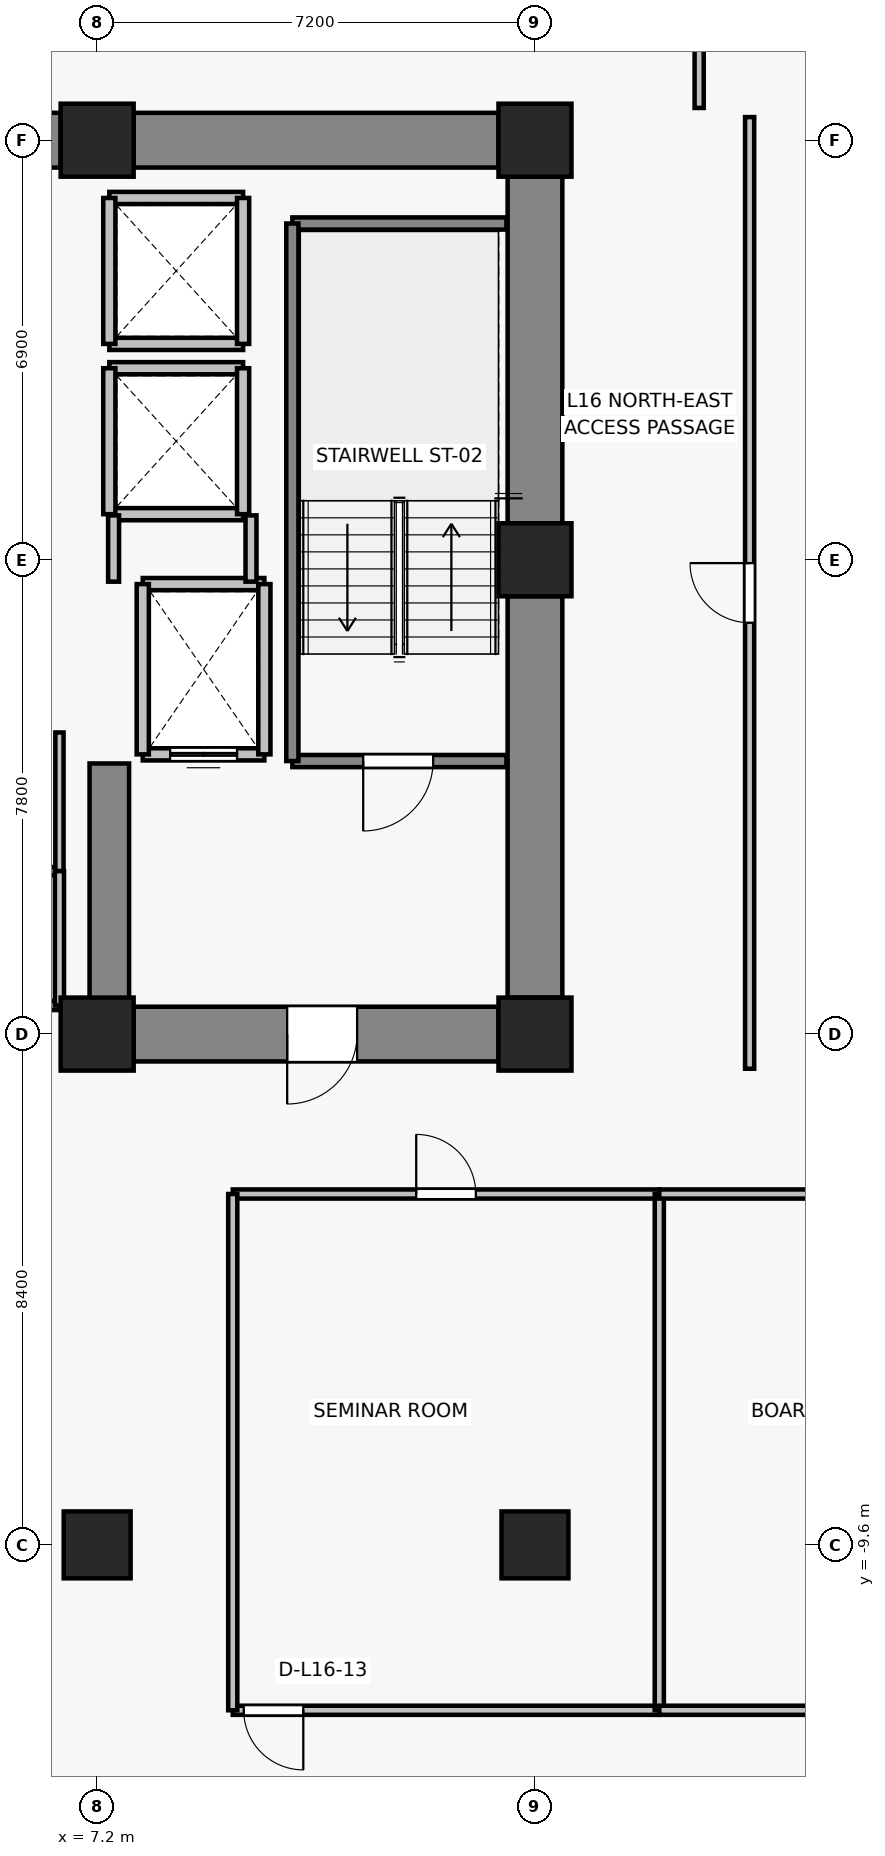
"""IFC4 building model, lengths in metres.
Left out: names, types, materials, properties, quantities, classifications, styles, units other than length and angle.
Written with IfcOpenShell. Run it as: python <this file> out.ifc"""

import sys

from ifc_helpers import new_model, si_unit, direction, frame, frame_2d, origin, origin_2d, place, context, subcontext, project, spatial, rectangle, extrude, source, transform, mapped, element, fill, save


model = new_model("IFC4")
c1 = context("Model", 3, precision=1e-05, world=origin(), true_north=direction((0.0, 1.0)))
c2 = subcontext(c1, "Body", "Model", "MODEL_VIEW")
j1 = project(units=[si_unit("LENGTHUNIT", "METRE"), si_unit("PLANEANGLEUNIT", "RADIAN")], contexts=[c1])
p1 = place(None, origin())
s1 = spatial("IfcSite", under=j1, at=p1, CompositionType="ELEMENT")
p2 = place(p1, origin())
s2 = spatial("IfcBuilding", under=s1, at=p2, CompositionType="ELEMENT")
p3 = place(p2, frame((0.0, 0.0, 60.4)))
s3 = spatial("IfcBuildingStorey", under=s2, at=p3, CompositionType="ELEMENT", Elevation=60.4)
for number, where, z_axis, x_axis in (
    (1, (7.2, -1.2, 0.0), (0.0, 0.0, 1.0), (1.0, 0.0, 0.0)),
    (2, (14.4, -1.2, 0.0), (0.0, 0.0, 1.0), (1.0, 0.0, 0.0)),
    (3, (14.4, 6.6, 0.0), (0.0, 0.0, 1.0), (1.0, 0.0, 0.0)),
    (4, (7.2, 13.5, 0.0), (0.0, 0.0, 1.0), (1.0, 0.0, 0.0)),
    (5, (14.4, 13.5, 0.0), (0.0, 0.0, 1.0), (1.0, 0.0, 0.0)),
):
    element("IfcColumn", number, at=place(p3, frame(where, z_axis=z_axis, x_axis=x_axis)), inside=s3, PredefinedType="COLUMN", context=c2, shape_type="SweptSolid", body=[
        extrude(rectangle(XDim=1.2, YDim=1.2, at=origin_2d()), origin(), (0.0, 0.0, 1.0), 3.3),
    ])
for number, where, z_axis, x_axis in (
    (6, (7.2, -9.6, 0.0), (0.0, 0.0, 1.0), (1.0, 0.0, 0.0)),
    (7, (14.4, -9.6, 0.0), (0.0, 0.0, 1.0), (1.0, 0.0, 0.0)),
):
    element("IfcColumn", number, at=place(p3, frame(where, z_axis=z_axis, x_axis=x_axis)), inside=s3, PredefinedType="COLUMN", context=c2, shape_type="SweptSolid", body=[
        extrude(rectangle(XDim=1.1, YDim=1.1, at=origin_2d()), origin(), (0.0, 0.0, 1.0), 3.3),
    ])
p4 = place(p3, frame((-6.6, 13.5, 0.0), z_axis=(0.0, 0.0, 1.0), x_axis=(1.0, 0.0, 0.0)))
e8 = element("IfcWall", 8, at=p4, inside=s3, PredefinedType="SHEAR", context=c2, shape_type="SweptSolid", body=[
    extrude(rectangle(XDim=13.2, YDim=0.9, at=frame_2d((6.6, 0.0))), origin(), (0.0, 0.0, 1.0), 3.075),
])
p5 = place(p3, frame((7.8, 13.5, 0.0), z_axis=(0.0, 0.0, 1.0), x_axis=(1.0, 0.0, 0.0)))
e9 = element("IfcWall", 9, at=p5, inside=s3, PredefinedType="SHEAR", context=c2, shape_type="SweptSolid", body=[
    extrude(rectangle(XDim=6.0, YDim=0.9, at=frame_2d((3.0, 0.0))), origin(), (0.0, 0.0, 1.0), 3.075),
])
p6 = place(p3, frame((14.4, -0.6, 0.0), z_axis=(0.0, 0.0, 1.0), x_axis=(0.0, 1.0, 0.0)))
e10 = element("IfcWall", 10, at=p6, inside=s3, PredefinedType="SHEAR", context=c2, shape_type="SweptSolid", body=[
    extrude(rectangle(XDim=6.6, YDim=0.9, at=frame_2d((3.3, 0.0))), origin(), (0.0, 0.0, 1.0), 3.075),
])
p7 = place(p3, frame((14.4, 7.2, 0.0), z_axis=(0.0, 0.0, 1.0), x_axis=(0.0, 1.0, 0.0)))
e11 = element("IfcWall", 11, at=p7, inside=s3, PredefinedType="SHEAR", context=c2, shape_type="SweptSolid", body=[
    extrude(rectangle(XDim=5.7, YDim=0.9, at=frame_2d((2.85, 0.0))), origin(), (0.0, 0.0, 1.0), 3.075),
])
p8 = place(p3, frame((13.8, -1.2, 0.0), z_axis=(0.0, 0.0, 1.0), x_axis=(-1.0, 0.0, 0.0)))
e12 = element("IfcWall", 12, at=p8, inside=s3, PredefinedType="SHEAR", context=c2, shape_type="SweptSolid", body=[
    extrude(rectangle(XDim=6.0, YDim=0.9, at=frame_2d((3.0, 0.0))), origin(), (0.0, 0.0, 1.0), 3.075),
])
p9 = place(p8, frame((2.325, 0.0, 0.0)))
e13 = element("IfcOpeningElement", 13, at=p9, cuts=e12, PredefinedType="OPENING", context=c2, shape_type="SweptSolid", body=[
    extrude(rectangle(XDim=1.15, YDim=2.15, at=frame_2d((0.575, 1.075))), frame((0.0, 0.46, 0.0), z_axis=(0.0, -1.0, 0.0), x_axis=(1.0, 0.0, 0.0)), (0.0, 0.0, 1.0), 0.92),
])
p10 = place(p3, frame((7.4, -0.75, 0.0), z_axis=(0.0, 0.0, 1.0), x_axis=(0.0, 1.0, 0.0)))
e14 = element("IfcWall", 14, at=p10, inside=s3, PredefinedType="SHEAR", context=c2, shape_type="SweptSolid", body=[
    extrude(rectangle(XDim=4.0, YDim=0.65, at=frame_2d((2.0, 0.0))), origin(), (0.0, 0.0, 1.0), 3.075),
])
p11 = place(p3, frame((9.95, 3.4, 0.0), z_axis=(0.0, 0.0, 1.0), x_axis=(-1.0, 0.0, 0.0)))
e15 = element("IfcWall", 15, at=p11, inside=s3, PredefinedType="SOLIDWALL", context=c2, shape_type="SweptSolid", body=[
    extrude(rectangle(XDim=2.0, YDim=0.2, at=frame_2d((1.0, 0.0))), origin(), (0.0, 0.0, 1.0), 3.075),
])
p12 = place(p11, frame((0.45, 0.0, 0.0)))
e16 = element("IfcOpeningElement", 16, at=p12, cuts=e15, PredefinedType="OPENING", context=c2, shape_type="SweptSolid", body=[
    extrude(rectangle(XDim=1.1, YDim=2.2, at=frame_2d((0.55, 1.1))), frame((0.0, 0.11, 0.0), z_axis=(0.0, -1.0, 0.0), x_axis=(1.0, 0.0, 0.0)), (0.0, 0.0, 1.0), 0.22),
])
p13 = place(p3, frame((7.95, 6.2, 0.0), z_axis=(0.0, 0.0, 1.0), x_axis=(1.0, 0.0, 0.0)))
e17 = element("IfcWall", 17, at=p13, inside=s3, PredefinedType="SOLIDWALL", context=c2, shape_type="SweptSolid", body=[
    extrude(rectangle(XDim=2.0, YDim=0.2, at=frame_2d((1.0, 0.0))), origin(), (0.0, 0.0, 1.0), 3.075),
])
for number, where, z_axis, x_axis in (
    (18, (7.95, 3.4, 0.0), (0.0, 0.0, 1.0), (0.0, 1.0, 0.0)),
    (19, (9.95, 6.2, 0.0), (0.0, 0.0, 1.0), (0.0, -1.0, 0.0)),
):
    element("IfcWall", number, at=place(p3, frame(where, z_axis=z_axis, x_axis=x_axis)), inside=s3, PredefinedType="SOLIDWALL", context=c2, shape_type="SweptSolid", body=[
        extrude(rectangle(XDim=2.8, YDim=0.2, at=frame_2d((1.4, 0.0))), origin(), (0.0, 0.0, 1.0), 3.075),
    ])
for number, where, z_axis, x_axis in (
    (20, (9.6, 7.35, 0.0), (0.0, 0.0, 1.0), (-1.0, 0.0, 0.0)),
    (21, (7.4, 9.75, 0.0), (0.0, 0.0, 1.0), (1.0, 0.0, 0.0)),
):
    element("IfcWall", number, at=place(p3, frame(where, z_axis=z_axis, x_axis=x_axis)), inside=s3, PredefinedType="SOLIDWALL", context=c2, shape_type="SweptSolid", body=[
        extrude(rectangle(XDim=2.2, YDim=0.2, at=frame_2d((1.1, 0.0))), origin(), (0.0, 0.0, 1.0), 2.465),
    ])
p14 = place(p3, frame((7.4, 7.35, 0.0), z_axis=(0.0, 0.0, 1.0), x_axis=(0.0, 1.0, 0.0)))
e22 = element("IfcWall", 22, at=p14, inside=s3, PredefinedType="SOLIDWALL", context=c2, shape_type="SweptSolid", body=[
    extrude(rectangle(XDim=2.4, YDim=0.2, at=frame_2d((1.2, 0.0))), origin(), (0.0, 0.0, 1.0), 2.465),
])
p15 = place(p3, frame((9.6, 9.75, 0.0), z_axis=(0.0, 0.0, 1.0), x_axis=(0.0, -1.0, 0.0)))
e23 = element("IfcWall", 23, at=p15, inside=s3, PredefinedType="SOLIDWALL", context=c2, shape_type="SweptSolid", body=[
    extrude(rectangle(XDim=2.4, YDim=0.2, at=frame_2d((1.2, 0.0))), origin(), (0.0, 0.0, 1.0), 3.075),
])
for number, where, z_axis, x_axis in (
    (24, (9.6, 10.15, 0.0), (0.0, 0.0, 1.0), (-1.0, 0.0, 0.0)),
    (25, (7.4, 12.55, 0.0), (0.0, 0.0, 1.0), (1.0, 0.0, 0.0)),
):
    element("IfcWall", number, at=place(p3, frame(where, z_axis=z_axis, x_axis=x_axis)), inside=s3, PredefinedType="SOLIDWALL", context=c2, shape_type="SweptSolid", body=[
        extrude(rectangle(XDim=2.2, YDim=0.2, at=frame_2d((1.1, 0.0))), origin(), (0.0, 0.0, 1.0), 2.465),
    ])
p16 = place(p3, frame((7.4, 10.15, 0.0), z_axis=(0.0, 0.0, 1.0), x_axis=(0.0, 1.0, 0.0)))
e26 = element("IfcWall", 26, at=p16, inside=s3, PredefinedType="SOLIDWALL", context=c2, shape_type="SweptSolid", body=[
    extrude(rectangle(XDim=2.4, YDim=0.2, at=frame_2d((1.2, 0.0))), origin(), (0.0, 0.0, 1.0), 2.465),
])
p17 = place(p3, frame((9.6, 12.55, 0.0), z_axis=(0.0, 0.0, 1.0), x_axis=(0.0, -1.0, 0.0)))
e27 = element("IfcWall", 27, at=p17, inside=s3, PredefinedType="SOLIDWALL", context=c2, shape_type="SweptSolid", body=[
    extrude(rectangle(XDim=2.4, YDim=0.2, at=frame_2d((1.2, 0.0))), origin(), (0.0, 0.0, 1.0), 3.075),
])
p18 = place(p3, frame((13.93, 3.29, 0.0), z_axis=(0.0, 0.0, 1.0), x_axis=(-1.0, 0.0, 0.0)))
e28 = element("IfcWall", 28, at=p18, inside=s3, PredefinedType="SOLIDWALL", context=c2, shape_type="SweptSolid", body=[
    extrude(rectangle(XDim=3.52, YDim=0.2, at=frame_2d((1.76, 0.0))), origin(), (0.0, 0.0, 1.0), 3.075),
])
p19 = place(p18, frame((1.205, 0.0, 0.0)))
e29 = element("IfcOpeningElement", 29, at=p19, cuts=e28, PredefinedType="OPENING", context=c2, shape_type="SweptSolid", body=[
    extrude(rectangle(XDim=1.15, YDim=2.15, at=frame_2d((0.575, 1.075))), frame((0.0, 0.11, 0.0), z_axis=(0.0, -1.0, 0.0), x_axis=(1.0, 0.0, 0.0)), (0.0, 0.0, 1.0), 0.22),
])
p20 = place(p3, frame((10.41, 12.13, 0.0), z_axis=(0.0, 0.0, 1.0), x_axis=(1.0, 0.0, 0.0)))
e30 = element("IfcWall", 30, at=p20, inside=s3, PredefinedType="SOLIDWALL", context=c2, shape_type="SweptSolid", body=[
    extrude(rectangle(XDim=3.52, YDim=0.2, at=frame_2d((1.76, 0.0))), origin(), (0.0, 0.0, 1.0), 3.075),
])
p21 = place(p3, frame((10.41, 3.29, 0.0), z_axis=(0.0, 0.0, 1.0), x_axis=(0.0, 1.0, 0.0)))
e31 = element("IfcWall", 31, at=p21, inside=s3, PredefinedType="SOLIDWALL", context=c2, shape_type="SweptSolid", body=[
    extrude(rectangle(XDim=8.84, YDim=0.2, at=frame_2d((4.42, 0.0))), origin(), (0.0, 0.0, 1.0), 3.075),
])
p22 = place(p3, frame((7.47, 6.24, 0.0), z_axis=(0.0, 0.0, 1.0), x_axis=(0.0, 1.0, 0.0)))
e32 = element("IfcWall", 32, at=p22, inside=s3, PredefinedType="PARTITIONING", context=c2, shape_type="SweptSolid", body=[
    extrude(rectangle(XDim=1.09, YDim=0.18, at=frame_2d((0.545, 0.0))), origin(), (0.0, 0.0, 1.0), 2.465),
])
p23 = place(p3, frame((9.73, 7.33, 0.0), z_axis=(0.0, 0.0, 1.0), x_axis=(0.0, -1.0, 0.0)))
e33 = element("IfcWall", 33, at=p23, inside=s3, PredefinedType="PARTITIONING", context=c2, shape_type="SweptSolid", body=[
    extrude(rectangle(XDim=1.09, YDim=0.18, at=frame_2d((0.545, 0.0))), origin(), (0.0, 0.0, 1.0), 3.075),
])
p24 = place(p3, frame((6.58, 1.48, 0.0), z_axis=(0.0, 0.0, 1.0), x_axis=(-1.0, 0.0, 0.0)))
e34 = element("IfcWall", 34, at=p24, inside=s3, PredefinedType="PARTITIONING", context=c2, shape_type="SweptSolid", body=[
    extrude(rectangle(XDim=5.11, YDim=0.135, at=frame_2d((2.555, 0.0))), origin(), (0.0, 0.0, 1.0), 3.075),
])
p25 = place(p3, frame((6.58, 3.76, 0.0), z_axis=(0.0, 0.0, 1.0), x_axis=(0.0, -1.0, 0.0)))
e35 = element("IfcWall", 35, at=p25, inside=s3, PredefinedType="PARTITIONING", context=c2, shape_type="SweptSolid", body=[
    extrude(rectangle(XDim=2.28, YDim=0.135, at=frame_2d((1.14, 0.0))), origin(), (0.0, 0.0, 1.0), 3.075),
])
p26 = place(p3, frame((6.58, -0.73, 0.0), z_axis=(0.0, 0.0, 1.0), x_axis=(-1.0, 0.0, 0.0)))
e36 = element("IfcWall", 36, at=p26, inside=s3, PredefinedType="PARTITIONING", context=c2, shape_type="SweptSolid", body=[
    extrude(rectangle(XDim=2.4, YDim=0.15, at=frame_2d((1.2, 0.0))), origin(), (0.0, 0.0, 1.0), 3.075),
])
p27 = place(p26, frame((0.76, 0.0, 0.0)))
e37 = element("IfcOpeningElement", 37, at=p27, cuts=e36, PredefinedType="OPENING", context=c2, shape_type="SweptSolid", body=[
    extrude(rectangle(XDim=0.88, YDim=2.1, at=frame_2d((0.44, 1.05))), frame((0.0, 0.085, 0.0), z_axis=(0.0, -1.0, 0.0), x_axis=(1.0, 0.0, 0.0)), (0.0, 0.0, 1.0), 0.17),
])
p28 = place(p3, frame((6.58, 1.48, 0.0), z_axis=(0.0, 0.0, 1.0), x_axis=(0.0, -1.0, 0.0)))
e38 = element("IfcWall", 38, at=p28, inside=s3, PredefinedType="PARTITIONING", context=c2, shape_type="SweptSolid", body=[
    extrude(rectangle(XDim=2.21, YDim=0.15, at=frame_2d((1.105, 0.0))), origin(), (0.0, 0.0, 1.0), 3.075),
])
p29 = place(p3, frame((16.445, -12.32, 0.0), z_axis=(0.0, 0.0, 1.0), x_axis=(-1.0, 0.0, 0.0)))
e39 = element("IfcWall", 39, at=p29, inside=s3, PredefinedType="PARTITIONING", context=c2, shape_type="SweptSolid", body=[
    extrude(rectangle(XDim=7.015, YDim=0.15, at=frame_2d((3.507, 0.0))), origin(), (0.0, 0.0, 1.0), 2.465),
])
p30 = place(p29, frame((5.854, 0.0, 0.0)))
e40 = element("IfcOpeningElement", 40, at=p30, cuts=e39, PredefinedType="OPENING", context=c2, shape_type="SweptSolid", body=[
    extrude(rectangle(XDim=0.98, YDim=2.15, at=frame_2d((0.49, 1.075))), frame((0.0, 0.085, 0.0), z_axis=(0.0, -1.0, 0.0), x_axis=(1.0, 0.0, 0.0)), (0.0, 0.0, 1.0), 0.17),
])
p31 = place(p3, frame((9.43, -3.83, 0.0), z_axis=(0.0, 0.0, 1.0), x_axis=(1.0, 0.0, 0.0)))
e41 = element("IfcWall", 41, at=p31, inside=s3, PredefinedType="PARTITIONING", context=c2, shape_type="SweptSolid", body=[
    extrude(rectangle(XDim=7.015, YDim=0.15, at=frame_2d((3.507, 0.0))), origin(), (0.0, 0.0, 1.0), 2.465),
])
p32 = place(p31, frame((3.017, 0.0, 0.0)))
e42 = element("IfcOpeningElement", 42, at=p32, cuts=e41, PredefinedType="OPENING", context=c2, shape_type="SweptSolid", body=[
    extrude(rectangle(XDim=0.98, YDim=2.15, at=frame_2d((0.49, 1.075))), frame((0.0, 0.085, 0.0), z_axis=(0.0, -1.0, 0.0), x_axis=(1.0, 0.0, 0.0)), (0.0, 0.0, 1.0), 0.17),
])
for number, where, z_axis, x_axis in (
    (43, (9.43, -12.32, 0.0), (0.0, 0.0, 1.0), (0.0, 1.0, 0.0)),
    (44, (16.445, -3.83, 0.0), (0.0, 0.0, 1.0), (0.0, -1.0, 0.0)),
):
    element("IfcWall", number, at=place(p3, frame(where, z_axis=z_axis, x_axis=x_axis)), inside=s3, PredefinedType="PARTITIONING", context=c2, shape_type="SweptSolid", body=[
        extrude(rectangle(XDim=8.49, YDim=0.15, at=frame_2d((4.245, 0.0))), origin(), (0.0, 0.0, 1.0), 2.465),
    ])
p33 = place(p3, frame((25.515, -12.32, 0.0), z_axis=(0.0, 0.0, 1.0), x_axis=(-1.0, 0.0, 0.0)))
e45 = element("IfcWall", 45, at=p33, inside=s3, PredefinedType="PARTITIONING", context=c2, shape_type="SweptSolid", body=[
    extrude(rectangle(XDim=9.071, YDim=0.15, at=frame_2d((4.535, 0.0))), origin(), (0.0, 0.0, 1.0), 2.465),
])
p34 = place(p3, frame((16.445, -3.83, 0.0), z_axis=(0.0, 0.0, 1.0), x_axis=(1.0, 0.0, 0.0)))
e46 = element("IfcWall", 46, at=p34, inside=s3, PredefinedType="PARTITIONING", context=c2, shape_type="SweptSolid", body=[
    extrude(rectangle(XDim=9.071, YDim=0.15, at=frame_2d((4.535, 0.0))), origin(), (0.0, 0.0, 1.0), 2.465),
])
p35 = place(p34, frame((3.827, 0.0, 0.0)))
e47 = element("IfcOpeningElement", 47, at=p35, cuts=e46, PredefinedType="OPENING", context=c2, shape_type="SweptSolid", body=[
    extrude(rectangle(XDim=0.98, YDim=2.15, at=frame_2d((0.49, 1.075))), frame((0.0, 0.085, 0.0), z_axis=(0.0, -1.0, 0.0), x_axis=(1.0, 0.0, 0.0)), (0.0, 0.0, 1.0), 0.17),
])
p36 = place(p3, frame((17.93, -1.77, 0.0), z_axis=(0.0, 0.0, 1.0), x_axis=(0.0, 1.0, 0.0)))
e48 = element("IfcWall", 48, at=p36, inside=s3, PredefinedType="PARTITIONING", context=c2, shape_type="SweptSolid", body=[
    extrude(rectangle(XDim=15.65, YDim=0.15, at=frame_2d((7.825, 0.0))), origin(), (0.0, 0.0, 1.0), 2.465),
])
p37 = place(p36, frame((7.335, 0.0, 0.0)))
e49 = element("IfcOpeningElement", 49, at=p37, cuts=e48, PredefinedType="OPENING", context=c2, shape_type="SweptSolid", body=[
    extrude(rectangle(XDim=0.98, YDim=2.15, at=frame_2d((0.49, 1.075))), frame((0.0, 0.085, 0.0), z_axis=(0.0, -1.0, 0.0), x_axis=(1.0, 0.0, 0.0)), (0.0, 0.0, 1.0), 0.17),
])
p38 = place(p3, frame((17.1, 18.13, 0.0), z_axis=(0.0, 0.0, 1.0), x_axis=(0.0, -1.0, 0.0)))
e50 = element("IfcWall", 50, at=p38, inside=s3, PredefinedType="PARTITIONING", context=c2, shape_type="SweptSolid", body=[
    extrude(rectangle(XDim=4.1, YDim=0.15, at=frame_2d((2.05, 0.0))), origin(), (0.0, 0.0, 1.0), 2.465),
])
m1 = source(origin(), c2, "Body", "SweptSolid", [
    extrude(rectangle(XDim=1.1, YDim=2.2, at=frame_2d((0.55, 1.1))), frame((0.0, 0.025, 0.0), z_axis=(0.0, -1.0, 0.0), x_axis=(1.0, 0.0, 0.0)), (0.0, 0.0, 1.0), 0.05),
])
p39 = place(p12, origin())
e51 = element("IfcDoor", 51, at=p39, inside=s3, OperationType="DOUBLE_DOOR_SLIDING", PredefinedType="DOOR", context=c2, shape_type="MappedRepresentation", body=[
    mapped(m1, transform((0.0, 0.0, 0.0), x_axis=(1.0, 0.0, 0.0), y_axis=(0.0, 1.0, 0.0), z_axis=(0.0, 0.0, 1.0), scale=1.0)),
])
fill(e16, e51)
m2 = source(origin(), c2, "Body", "SweptSolid", [
    extrude(rectangle(XDim=1.15, YDim=2.15, at=frame_2d((0.575, 1.075))), frame((0.0, 0.025, 0.0), z_axis=(0.0, -1.0, 0.0), x_axis=(1.0, 0.0, 0.0)), (0.0, 0.0, 1.0), 0.05),
])
p40 = place(p19, origin())
e52 = element("IfcDoor", 52, at=p40, inside=s3, OperationType="SINGLE_SWING_RIGHT", PredefinedType="DOOR", context=c2, shape_type="MappedRepresentation", body=[
    mapped(m2, transform((0.0, 0.0, 0.0), x_axis=(1.0, 0.0, 0.0), y_axis=(0.0, 1.0, 0.0), z_axis=(0.0, 0.0, 1.0), scale=1.0)),
])
fill(e29, e52)
p41 = place(p9, origin())
e53 = element("IfcDoor", 53, at=p41, inside=s3, OperationType="SINGLE_SWING_RIGHT", PredefinedType="DOOR", context=c2, shape_type="MappedRepresentation", body=[
    mapped(m2, transform((0.0, 0.0, 0.0), x_axis=(1.0, 0.0, 0.0), y_axis=(0.0, 1.0, 0.0), z_axis=(0.0, 0.0, 1.0), scale=1.0)),
])
fill(e13, e53)
m3 = source(origin(), c2, "Body", "SweptSolid", [
    extrude(rectangle(XDim=0.98, YDim=2.15, at=frame_2d((0.49, 1.075))), frame((0.0, 0.025, 0.0), z_axis=(0.0, -1.0, 0.0), x_axis=(1.0, 0.0, 0.0)), (0.0, 0.0, 1.0), 0.05),
])
p42 = place(p32, origin())
e54 = element("IfcDoor", 54, at=p42, inside=s3, OperationType="SINGLE_SWING_LEFT", PredefinedType="DOOR", context=c2, shape_type="MappedRepresentation", body=[
    mapped(m3, transform((0.0, 0.0, 0.0), x_axis=(1.0, 0.0, 0.0), y_axis=(0.0, 1.0, 0.0), z_axis=(0.0, 0.0, 1.0), scale=1.0)),
])
fill(e42, e54)
p43 = place(p30, origin())
e55 = element("IfcDoor", 55, at=p43, inside=s3, OperationType="SINGLE_SWING_LEFT", PredefinedType="DOOR", context=c2, shape_type="MappedRepresentation", body=[
    mapped(m3, transform((0.0, 0.0, 0.0), x_axis=(1.0, 0.0, 0.0), y_axis=(0.0, 1.0, 0.0), z_axis=(0.0, 0.0, 1.0), scale=1.0)),
])
fill(e40, e55)
p44 = place(p37, origin())
e56 = element("IfcDoor", 56, at=p44, inside=s3, OperationType="SINGLE_SWING_RIGHT", PredefinedType="DOOR", context=c2, shape_type="MappedRepresentation", body=[
    mapped(m3, transform((0.0, 0.0, 0.0), x_axis=(1.0, 0.0, 0.0), y_axis=(0.0, 1.0, 0.0), z_axis=(0.0, 0.0, 1.0), scale=1.0)),
])
fill(e49, e56)
save(model, sys.argv[1])
